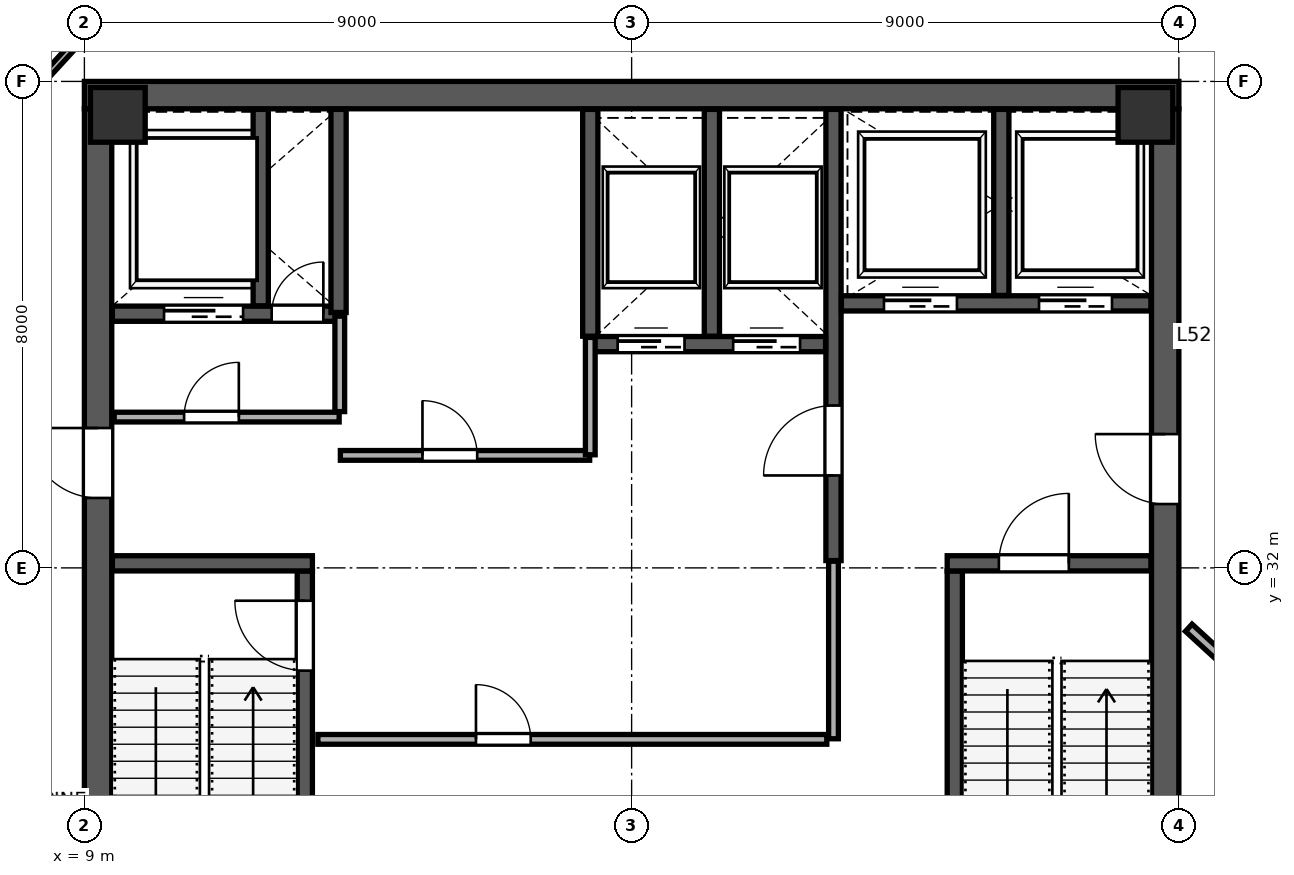
"""IFC4 building model, lengths in metres.
Left out: names, types, materials, properties, quantities, classifications, styles, units other than length and angle.
Written with IfcOpenShell. Run it as: python <this file> out.ifc"""

import sys

from ifc_helpers import new_model, si_unit, direction, frame, frame_2d, origin, origin_2d, place, context, subcontext, project, spatial, rectangle, extrude, source, transform, mapped, element, fill, save


model = new_model("IFC4")
c1 = context("Model", 3, precision=1e-05, world=origin(), true_north=direction((0.0, 1.0)))
c2 = subcontext(c1, "Body", "Model", "MODEL_VIEW")
j1 = project(units=[si_unit("LENGTHUNIT", "METRE"), si_unit("PLANEANGLEUNIT", "RADIAN")], contexts=[c1])
p1 = place(None, origin())
s1 = spatial("IfcSite", under=j1, at=p1, CompositionType="ELEMENT")
p2 = place(p1, origin())
s2 = spatial("IfcBuilding", under=s1, at=p2, CompositionType="ELEMENT")
p3 = place(p2, frame((0.0, 0.0, 233.2)))
s3 = spatial("IfcBuildingStorey", under=s2, at=p3, CompositionType="ELEMENT", Elevation=233.2)
m1 = source(origin(), c2, "Body", "SweptSolid", [
    extrude(rectangle(XDim=0.9, YDim=0.9, at=origin_2d()), origin(), (0.0, 0.0, 1.0), 4.198),
])
for number, where, z_axis, x_axis in (
    (1, (9.55, 39.45, 0.001), (0.0, 0.0, 1.0), (1.0, 0.0, 0.0)),
    (2, (26.45, 39.45, 0.001), (0.0, 0.0, 1.0), (1.0, 0.0, 0.0)),
):
    element("IfcColumn", number, at=place(p3, frame(where, z_axis=z_axis, x_axis=x_axis)), inside=s3, PredefinedType="COLUMN", context=c2, shape_type="MappedRepresentation", body=[
        mapped(m1, transform((0.0, 0.0, 0.0), scale=1.0)),
    ])
p4 = place(p3, frame((9.225, 24.45, 0.0), z_axis=(0.0, 0.0, 1.0), x_axis=(0.0, 1.0, 0.0)))
e3 = element("IfcWall", 3, at=p4, inside=s3, PredefinedType="SHEAR", context=c2, shape_type="SweptSolid", body=[
    extrude(rectangle(XDim=15.1, YDim=0.45, at=frame_2d((7.55, 0.0))), origin(), (0.0, 0.0, 1.0), 3.96),
])
p5 = place(p4, frame((8.7, 0.0, 0.0)))
e4 = element("IfcOpeningElement", 4, at=p5, cuts=e3, PredefinedType="OPENING", context=c2, shape_type="SweptSolid", body=[
    extrude(rectangle(XDim=1.15, YDim=2.2, at=frame_2d((0.575, 1.1))), frame((0.0, 0.235, 0.0), z_axis=(0.0, -1.0, 0.0), x_axis=(1.0, 0.0, 0.0)), (0.0, 0.0, 1.0), 0.47),
])
p6 = place(p3, frame((26.775, 24.45, 0.0), z_axis=(0.0, 0.0, 1.0), x_axis=(0.0, 1.0, 0.0)))
e5 = element("IfcWall", 5, at=p6, inside=s3, PredefinedType="SHEAR", context=c2, shape_type="SweptSolid", body=[
    extrude(rectangle(XDim=15.1, YDim=0.45, at=frame_2d((7.55, 0.0))), origin(), (0.0, 0.0, 1.0), 3.96),
])
p7 = place(p6, frame((8.6, 0.0, 0.0)))
e6 = element("IfcOpeningElement", 6, at=p7, cuts=e5, PredefinedType="OPENING", context=c2, shape_type="SweptSolid", body=[
    extrude(rectangle(XDim=1.15, YDim=2.2, at=frame_2d((0.575, 1.1))), frame((0.0, 0.235, 0.0), z_axis=(0.0, -1.0, 0.0), x_axis=(1.0, 0.0, 0.0)), (0.0, 0.0, 1.0), 0.47),
])
p8 = place(p3, frame((9.0, 39.775, 0.0), z_axis=(0.0, 0.0, 1.0), x_axis=(1.0, 0.0, 0.0)))
e7 = element("IfcWall", 7, at=p8, inside=s3, PredefinedType="SHEAR", context=c2, shape_type="SweptSolid", body=[
    extrude(rectangle(XDim=18.0, YDim=0.45, at=frame_2d((9.0, 0.0))), origin(), (0.0, 0.0, 1.0), 3.96),
])
p9 = place(p3, frame((12.625, 24.46, 0.0), z_axis=(0.0, 0.0, 1.0), x_axis=(0.0, 1.0, 0.0)))
e8 = element("IfcWall", 8, at=p9, inside=s3, PredefinedType="SHEAR", context=c2, shape_type="SweptSolid", body=[
    extrude(rectangle(XDim=7.49, YDim=0.25, at=frame_2d((3.745, 0.0))), origin(), (0.0, 0.0, 1.0), 3.96),
])
p10 = place(p9, frame((5.85, 0.0, 0.0)))
e9 = element("IfcOpeningElement", 9, at=p10, cuts=e8, PredefinedType="OPENING", context=c2, shape_type="SweptSolid", body=[
    extrude(rectangle(XDim=1.15, YDim=2.2, at=frame_2d((0.575, 1.1))), frame((0.0, 0.135, 0.0), z_axis=(0.0, -1.0, 0.0), x_axis=(1.0, 0.0, 0.0)), (0.0, 0.0, 1.0), 0.27),
])
p11 = place(p3, frame((9.46, 32.075, 0.0), z_axis=(0.0, 0.0, 1.0), x_axis=(1.0, 0.0, 0.0)))
e10 = element("IfcWall", 10, at=p11, inside=s3, PredefinedType="SHEAR", context=c2, shape_type="SweptSolid", body=[
    extrude(rectangle(XDim=3.29, YDim=0.25, at=frame_2d((1.645, 0.0))), origin(), (0.0, 0.0, 1.0), 3.96),
])
p12 = place(p3, frame((23.315, 24.46, 0.0), z_axis=(0.0, 0.0, 1.0), x_axis=(0.0, 1.0, 0.0)))
e11 = element("IfcWall", 11, at=p12, inside=s3, PredefinedType="SHEAR", context=c2, shape_type="SweptSolid", body=[
    extrude(rectangle(XDim=7.49, YDim=0.25, at=frame_2d((3.745, 0.0))), origin(), (0.0, 0.0, 1.0), 3.96),
])
p13 = place(p3, frame((23.19, 32.075, 0.0), z_axis=(0.0, 0.0, 1.0), x_axis=(1.0, 0.0, 0.0)))
e12 = element("IfcWall", 12, at=p13, inside=s3, PredefinedType="SHEAR", context=c2, shape_type="SweptSolid", body=[
    extrude(rectangle(XDim=3.35, YDim=0.25, at=frame_2d((1.675, 0.0))), origin(), (0.0, 0.0, 1.0), 3.96),
])
p14 = place(p13, frame((0.85, 0.0, 0.0)))
e13 = element("IfcOpeningElement", 13, at=p14, cuts=e12, PredefinedType="OPENING", context=c2, shape_type="SweptSolid", body=[
    extrude(rectangle(XDim=1.15, YDim=2.2, at=frame_2d((0.575, 1.1))), frame((0.0, 0.135, 0.0), z_axis=(0.0, -1.0, 0.0), x_axis=(1.0, 0.0, 0.0)), (0.0, 0.0, 1.0), 0.27),
])
p15 = place(p3, frame((21.32, 32.12, 0.0), z_axis=(0.0, 0.0, 1.0), x_axis=(0.0, 1.0, 0.0)))
e14 = element("IfcWall", 14, at=p15, inside=s3, PredefinedType="SHEAR", context=c2, shape_type="SweptSolid", body=[
    extrude(rectangle(XDim=7.42, YDim=0.25, at=frame_2d((3.71, 0.0))), origin(), (0.0, 0.0, 1.0), 3.96),
])
p16 = place(p15, frame((1.4, 0.0, 0.0)))
e15 = element("IfcOpeningElement", 15, at=p16, cuts=e14, PredefinedType="OPENING", context=c2, shape_type="SweptSolid", body=[
    extrude(rectangle(XDim=1.15, YDim=2.2, at=frame_2d((0.575, 1.1))), frame((0.0, 0.135, 0.0), z_axis=(0.0, -1.0, 0.0), x_axis=(1.0, 0.0, 0.0)), (0.0, 0.0, 1.0), 0.27),
])
p17 = place(p3, frame((9.46, 36.18, 0.0), z_axis=(0.0, 0.0, 1.0), x_axis=(1.0, 0.0, 0.0)))
e16 = element("IfcWall", 16, at=p17, inside=s3, PredefinedType="SHEAR", context=c2, shape_type="SweptSolid", body=[
    extrude(rectangle(XDim=3.79, YDim=0.25, at=frame_2d((1.895, 0.0))), origin(), (0.0, 0.0, 1.0), 3.96),
])
p18 = place(p17, frame((2.62, 0.0, 0.0)))
e17 = element("IfcOpeningElement", 17, at=p18, cuts=e16, PredefinedType="OPENING", context=c2, shape_type="SweptSolid", body=[
    extrude(rectangle(XDim=0.85, YDim=2.1, at=frame_2d((0.425, 1.05))), frame((0.0, 0.135, 0.0), z_axis=(0.0, -1.0, 0.0), x_axis=(1.0, 0.0, 0.0)), (0.0, 0.0, 1.0), 0.27),
])
p19 = place(p17, frame((0.85, 0.0, 0.0)))
e18 = element("IfcOpeningElement", 18, at=p19, cuts=e16, PredefinedType="OPENING", context=c2, shape_type="SweptSolid", body=[
    extrude(rectangle(XDim=1.3, YDim=2.25, at=frame_2d((0.65, 1.125))), frame((0.0, 0.135, 0.0), z_axis=(0.0, -1.0, 0.0), x_axis=(1.0, 0.0, 0.0)), (0.0, 0.0, 1.0), 0.27),
])
p20 = place(p3, frame((11.9, 36.31, 0.0), z_axis=(0.0, 0.0, 1.0), x_axis=(0.0, 1.0, 0.0)))
e19 = element("IfcWall", 19, at=p20, inside=s3, PredefinedType="SHEAR", context=c2, shape_type="SweptSolid", body=[
    extrude(rectangle(XDim=3.23, YDim=0.25, at=frame_2d((1.615, 0.0))), origin(), (0.0, 0.0, 1.0), 3.96),
])
p21 = place(p3, frame((21.45, 36.35, 0.0), z_axis=(0.0, 0.0, 1.0), x_axis=(1.0, 0.0, 0.0)))
e20 = element("IfcWall", 20, at=p21, inside=s3, PredefinedType="SHEAR", context=c2, shape_type="SweptSolid", body=[
    extrude(rectangle(XDim=5.09, YDim=0.25, at=frame_2d((2.545, 0.0))), origin(), (0.0, 0.0, 1.0), 3.96),
])
p22 = place(p21, frame((0.7, 0.0, 0.0)))
e21 = element("IfcOpeningElement", 21, at=p22, cuts=e20, PredefinedType="OPENING", context=c2, shape_type="SweptSolid", body=[
    extrude(rectangle(XDim=1.2, YDim=2.2, at=frame_2d((0.6, 1.1))), frame((0.0, 0.135, 0.0), z_axis=(0.0, -1.0, 0.0), x_axis=(1.0, 0.0, 0.0)), (0.0, 0.0, 1.0), 0.27),
])
p23 = place(p21, frame((3.25, 0.0, 0.0)))
e22 = element("IfcOpeningElement", 22, at=p23, cuts=e20, PredefinedType="OPENING", context=c2, shape_type="SweptSolid", body=[
    extrude(rectangle(XDim=1.2, YDim=2.2, at=frame_2d((0.6, 1.1))), frame((0.0, 0.135, 0.0), z_axis=(0.0, -1.0, 0.0), x_axis=(1.0, 0.0, 0.0)), (0.0, 0.0, 1.0), 0.27),
])
p24 = place(p3, frame((24.08, 36.48, 0.0), z_axis=(0.0, 0.0, 1.0), x_axis=(0.0, 1.0, 0.0)))
e23 = element("IfcWall", 23, at=p24, inside=s3, PredefinedType="SHEAR", context=c2, shape_type="SweptSolid", body=[
    extrude(rectangle(XDim=3.06, YDim=0.25, at=frame_2d((1.53, 0.0))), origin(), (0.0, 0.0, 1.0), 3.96),
])
p25 = place(p3, frame((13.18, 36.2, 0.0), z_axis=(0.0, 0.0, 1.0), x_axis=(0.0, 1.0, 0.0)))
e24 = element("IfcWall", 24, at=p25, inside=s3, PredefinedType="SHEAR", context=c2, shape_type="SweptSolid", body=[
    extrude(rectangle(XDim=3.34, YDim=0.25, at=frame_2d((1.67, 0.0))), origin(), (0.0, 0.0, 1.0), 3.96),
])
p26 = place(p3, frame((17.32, 35.68, 0.0), z_axis=(0.0, 0.0, 1.0), x_axis=(1.0, 0.0, 0.0)))
e25 = element("IfcWall", 25, at=p26, inside=s3, PredefinedType="SHEAR", context=c2, shape_type="SweptSolid", body=[
    extrude(rectangle(XDim=3.87, YDim=0.25, at=frame_2d((1.935, 0.0))), origin(), (0.0, 0.0, 1.0), 3.96),
])
p27 = place(p26, frame((0.45, 0.0, 0.0)))
e26 = element("IfcOpeningElement", 26, at=p27, cuts=e25, PredefinedType="OPENING", context=c2, shape_type="SweptSolid", body=[
    extrude(rectangle(XDim=1.1, YDim=2.2, at=frame_2d((0.55, 1.1))), frame((0.0, 0.135, 0.0), z_axis=(0.0, -1.0, 0.0), x_axis=(1.0, 0.0, 0.0)), (0.0, 0.0, 1.0), 0.27),
])
p28 = place(p26, frame((2.35, 0.0, 0.0)))
e27 = element("IfcOpeningElement", 27, at=p28, cuts=e25, PredefinedType="OPENING", context=c2, shape_type="SweptSolid", body=[
    extrude(rectangle(XDim=1.1, YDim=2.2, at=frame_2d((0.55, 1.1))), frame((0.0, 0.135, 0.0), z_axis=(0.0, -1.0, 0.0), x_axis=(1.0, 0.0, 0.0)), (0.0, 0.0, 1.0), 0.27),
])
for number, where, z_axis, x_axis in (
    (28, (17.32, 35.81, 0.0), (0.0, 0.0, 1.0), (0.0, 1.0, 0.0)),
    (29, (19.32, 35.81, 0.0), (0.0, 0.0, 1.0), (0.0, 1.0, 0.0)),
):
    element("IfcWall", number, at=place(p3, frame(where, z_axis=z_axis, x_axis=x_axis)), inside=s3, PredefinedType="SHEAR", context=c2, shape_type="SweptSolid", body=[
        extrude(rectangle(XDim=3.73, YDim=0.25, at=frame_2d((1.865, 0.0))), origin(), (0.0, 0.0, 1.0), 3.96),
    ])
p29 = place(p3, frame((9.49, 34.48, 0.0), z_axis=(0.0, 0.0, 1.0), x_axis=(1.0, 0.0, 0.0)))
e30 = element("IfcWall", 30, at=p29, inside=s3, PredefinedType="PARTITIONING", context=c2, shape_type="SweptSolid", body=[
    extrude(rectangle(XDim=3.7, YDim=0.16, at=frame_2d((1.85, 0.0))), origin(), (0.0, 0.0, 1.0), 3.96),
])
p30 = place(p29, frame((1.15, 0.0, 0.0)))
e31 = element("IfcOpeningElement", 31, at=p30, cuts=e30, PredefinedType="OPENING", context=c2, shape_type="SweptSolid", body=[
    extrude(rectangle(XDim=0.9, YDim=2.15, at=frame_2d((0.45, 1.075))), frame((0.0, 0.09, 0.0), z_axis=(0.0, -1.0, 0.0), x_axis=(1.0, 0.0, 0.0)), (0.0, 0.0, 1.0), 0.18),
])
p31 = place(p3, frame((13.2, 34.57, 0.0), z_axis=(0.0, 0.0, 1.0), x_axis=(0.0, 1.0, 0.0)))
e32 = element("IfcWall", 32, at=p31, inside=s3, PredefinedType="PARTITIONING", context=c2, shape_type="SweptSolid", body=[
    extrude(rectangle(XDim=1.57, YDim=0.16, at=frame_2d((0.785, 0.0))), origin(), (0.0, 0.0, 1.0), 3.96),
])
p32 = place(p3, frame((13.21, 33.85, 0.0), z_axis=(0.0, 0.0, 1.0), x_axis=(1.0, 0.0, 0.0)))
e33 = element("IfcWall", 33, at=p32, inside=s3, PredefinedType="PARTITIONING", context=c2, shape_type="SweptSolid", body=[
    extrude(rectangle(XDim=4.1, YDim=0.16, at=frame_2d((2.05, 0.0))), origin(), (0.0, 0.0, 1.0), 3.96),
])
p33 = place(p32, frame((1.35, 0.0, 0.0)))
e34 = element("IfcOpeningElement", 34, at=p33, cuts=e33, PredefinedType="OPENING", context=c2, shape_type="SweptSolid", body=[
    extrude(rectangle(XDim=0.9, YDim=2.15, at=frame_2d((0.45, 1.075))), frame((0.0, 0.09, 0.0), z_axis=(0.0, -1.0, 0.0), x_axis=(1.0, 0.0, 0.0)), (0.0, 0.0, 1.0), 0.18),
])
p34 = place(p3, frame((17.32, 33.86, 0.0), z_axis=(0.0, 0.0, 1.0), x_axis=(0.0, 1.0, 0.0)))
e35 = element("IfcWall", 35, at=p34, inside=s3, PredefinedType="PARTITIONING", context=c2, shape_type="SweptSolid", body=[
    extrude(rectangle(XDim=1.93, YDim=0.16, at=frame_2d((0.965, 0.0))), origin(), (0.0, 0.0, 1.0), 3.96),
])
p35 = place(p3, frame((12.84, 29.18, 0.0), z_axis=(0.0, 0.0, 1.0), x_axis=(1.0, 0.0, 0.0)))
e36 = element("IfcWall", 36, at=p35, inside=s3, PredefinedType="PARTITIONING", context=c2, shape_type="SweptSolid", body=[
    extrude(rectangle(XDim=8.37, YDim=0.16, at=frame_2d((4.185, 0.0))), origin(), (0.0, 0.0, 1.0), 3.96),
])
p36 = place(p35, frame((2.6, 0.0, 0.0)))
e37 = element("IfcOpeningElement", 37, at=p36, cuts=e36, PredefinedType="OPENING", context=c2, shape_type="SweptSolid", body=[
    extrude(rectangle(XDim=0.9, YDim=2.15, at=frame_2d((0.45, 1.075))), frame((0.0, 0.09, 0.0), z_axis=(0.0, -1.0, 0.0), x_axis=(1.0, 0.0, 0.0)), (0.0, 0.0, 1.0), 0.18),
])
p37 = place(p3, frame((21.32, 29.19, 0.0), z_axis=(0.0, 0.0, 1.0), x_axis=(0.0, 1.0, 0.0)))
e38 = element("IfcWall", 38, at=p37, inside=s3, PredefinedType="PARTITIONING", context=c2, shape_type="SweptSolid", body=[
    extrude(rectangle(XDim=2.92, YDim=0.16, at=frame_2d((1.46, 0.0))), origin(), (0.0, 0.0, 1.0), 3.96),
])
p38 = place(p3, frame((27.163, 31.016, 0.0), z_axis=(0.0, 0.0, 1.0), x_axis=(0.737296869908, -0.675568890361, 0.0)))
e39 = element("IfcWall", 39, at=p38, inside=s3, PredefinedType="PARTITIONING", context=c2, shape_type="SweptSolid", body=[
    extrude(rectangle(XDim=1.42, YDim=0.16, at=frame_2d((0.71, 0.0))), origin(), (0.0, 0.0, 1.0), 3.96),
])
p39 = place(p3, frame((17.504, 50.744, 0.0), z_axis=(0.0, 0.0, 1.0), x_axis=(0.737277850523, -0.675589646996, 0.0)))
e40 = element("IfcWall", 40, at=p39, inside=s3, PredefinedType="PARTITIONING", context=c2, shape_type="SweptSolid", body=[
    extrude(rectangle(XDim=21.87, YDim=0.1, at=frame_2d((10.935, 0.0))), origin(), (0.0, 0.0, 1.0), 3.96),
])
p40 = place(p39, frame((5.4, 0.0, 0.0)))
e41 = element("IfcOpeningElement", 41, at=p40, cuts=e40, PredefinedType="OPENING", context=c2, shape_type="SweptSolid", body=[
    extrude(rectangle(XDim=0.95, YDim=2.15, at=frame_2d((0.475, 1.075))), frame((0.0, 0.06, 0.0), z_axis=(0.0, -1.0, 0.0), x_axis=(1.0, 0.0, 0.0)), (0.0, 0.0, 1.0), 0.12),
])
p41 = place(p3, frame((1.73, 32.85, 0.0), z_axis=(0.0, 0.0, 1.0), x_axis=(0.675589845589, 0.737277668546, 0.0)))
e42 = element("IfcWall", 42, at=p41, inside=s3, PredefinedType="PARTITIONING", context=c2, shape_type="SweptSolid", body=[
    extrude(rectangle(XDim=26.742, YDim=0.115, at=frame_2d((13.371, 0.0))), origin(), (0.0, 0.0, 1.0), 3.96),
])
m2 = source(origin(), c2, "Body", "SweptSolid", [
    extrude(rectangle(XDim=1.15, YDim=2.2, at=frame_2d((0.575, 1.1))), frame((0.0, 0.025, 0.0), z_axis=(0.0, -1.0, 0.0), x_axis=(1.0, 0.0, 0.0)), (0.0, 0.0, 1.0), 0.05),
])
p42 = place(p10, origin())
e43 = element("IfcDoor", 43, at=p42, inside=s3, OperationType="SINGLE_SWING_RIGHT", PredefinedType="DOOR", context=c2, shape_type="MappedRepresentation", body=[
    mapped(m2, transform((0.0, 0.0, 0.0), scale=1.0)),
])
fill(e9, e43)
m3 = source(origin(), c2, "Body", "SweptSolid", [
    extrude(rectangle(XDim=1.15, YDim=2.2, at=frame_2d((0.575, 1.1))), frame((0.0, 0.025, 0.0), z_axis=(0.0, -1.0, 0.0), x_axis=(1.0, 0.0, 0.0)), (0.0, 0.0, 1.0), 0.05),
])
p43 = place(p16, origin())
e44 = element("IfcDoor", 44, at=p43, inside=s3, OperationType="SINGLE_SWING_LEFT", PredefinedType="DOOR", context=c2, shape_type="MappedRepresentation", body=[
    mapped(m3, transform((0.0, 0.0, 0.0), scale=1.0)),
])
fill(e15, e44)
p44 = place(p14, origin())
e45 = element("IfcDoor", 45, at=p44, inside=s3, OperationType="SINGLE_SWING_RIGHT", PredefinedType="DOOR", context=c2, shape_type="MappedRepresentation", body=[
    mapped(m2, transform((0.0, 0.0, 0.0), scale=1.0)),
])
fill(e13, e45)
p45 = place(p7, origin())
e46 = element("IfcDoor", 46, at=p45, inside=s3, OperationType="SINGLE_SWING_RIGHT", PredefinedType="DOOR", context=c2, shape_type="MappedRepresentation", body=[
    mapped(m3, transform((0.0, 0.0, 0.0), scale=1.0)),
])
fill(e6, e46)
p46 = place(p5, origin())
e47 = element("IfcDoor", 47, at=p46, inside=s3, OperationType="SINGLE_SWING_RIGHT", PredefinedType="DOOR", context=c2, shape_type="MappedRepresentation", body=[
    mapped(m3, transform((0.0, 0.0, 0.0), scale=1.0)),
])
fill(e4, e47)
m4 = source(origin(), c2, "Body", "SweptSolid", [
    extrude(rectangle(XDim=0.85, YDim=2.1, at=frame_2d((0.425, 1.05))), frame((0.0, 0.025, 0.0), z_axis=(0.0, -1.0, 0.0), x_axis=(1.0, 0.0, 0.0)), (0.0, 0.0, 1.0), 0.05),
])
p47 = place(p18, origin())
e48 = element("IfcDoor", 48, at=p47, inside=s3, OperationType="SINGLE_SWING_RIGHT", PredefinedType="DOOR", context=c2, shape_type="MappedRepresentation", body=[
    mapped(m4, transform((0.0, 0.0, 0.0), scale=1.0)),
])
fill(e17, e48)
m5 = source(origin(), c2, "Body", "SweptSolid", [
    extrude(rectangle(XDim=1.1, YDim=2.2, at=frame_2d((0.55, 1.1))), frame((0.0, 0.025, 0.0), z_axis=(0.0, -1.0, 0.0), x_axis=(1.0, 0.0, 0.0)), (0.0, 0.0, 1.0), 0.05),
])
p48 = place(p27, origin())
e49 = element("IfcDoor", 49, at=p48, inside=s3, OperationType="SLIDING_TO_LEFT", PredefinedType="DOOR", context=c2, shape_type="MappedRepresentation", body=[
    mapped(m5, transform((0.0, 0.0, 0.0), scale=1.0)),
])
fill(e26, e49)
p49 = place(p28, origin())
e50 = element("IfcDoor", 50, at=p49, inside=s3, OperationType="SLIDING_TO_RIGHT", PredefinedType="DOOR", context=c2, shape_type="MappedRepresentation", body=[
    mapped(m5, transform((0.0, 0.0, 0.0), scale=1.0)),
])
fill(e27, e50)
m6 = source(origin(), c2, "Body", "SweptSolid", [
    extrude(rectangle(XDim=1.2, YDim=2.2, at=frame_2d((0.6, 1.1))), frame((0.0, 0.025, 0.0), z_axis=(0.0, -1.0, 0.0), x_axis=(1.0, 0.0, 0.0)), (0.0, 0.0, 1.0), 0.05),
])
p50 = place(p22, origin())
e51 = element("IfcDoor", 51, at=p50, inside=s3, OperationType="SLIDING_TO_LEFT", PredefinedType="DOOR", context=c2, shape_type="MappedRepresentation", body=[
    mapped(m6, transform((0.0, 0.0, 0.0), scale=1.0)),
])
fill(e21, e51)
p51 = place(p23, origin())
e52 = element("IfcDoor", 52, at=p51, inside=s3, OperationType="SLIDING_TO_RIGHT", PredefinedType="DOOR", context=c2, shape_type="MappedRepresentation", body=[
    mapped(m6, transform((0.0, 0.0, 0.0), scale=1.0)),
])
fill(e22, e52)
m7 = source(origin(), c2, "Body", "SweptSolid", [
    extrude(rectangle(XDim=1.3, YDim=2.25, at=frame_2d((0.65, 1.125))), frame((0.0, 0.025, 0.0), z_axis=(0.0, -1.0, 0.0), x_axis=(1.0, 0.0, 0.0)), (0.0, 0.0, 1.0), 0.05),
])
p52 = place(p19, origin())
e53 = element("IfcDoor", 53, at=p52, inside=s3, OperationType="SLIDING_TO_LEFT", PredefinedType="DOOR", context=c2, shape_type="MappedRepresentation", body=[
    mapped(m7, transform((0.0, 0.0, 0.0), scale=1.0)),
])
fill(e18, e53)
m8 = source(origin(), c2, "Body", "SweptSolid", [
    extrude(rectangle(XDim=0.9, YDim=2.15, at=frame_2d((0.45, 1.075))), frame((0.0, 0.025, 0.0), z_axis=(0.0, -1.0, 0.0), x_axis=(1.0, 0.0, 0.0)), (0.0, 0.0, 1.0), 0.05),
])
p53 = place(p30, origin())
e54 = element("IfcDoor", 54, at=p53, inside=s3, OperationType="SINGLE_SWING_RIGHT", PredefinedType="DOOR", context=c2, shape_type="MappedRepresentation", body=[
    mapped(m8, transform((0.0, 0.0, 0.0), scale=1.0)),
])
fill(e31, e54)
p54 = place(p33, origin())
e55 = element("IfcDoor", 55, at=p54, inside=s3, OperationType="SINGLE_SWING_LEFT", PredefinedType="DOOR", context=c2, shape_type="MappedRepresentation", body=[
    mapped(m8, transform((0.0, 0.0, 0.0), scale=1.0)),
])
fill(e34, e55)
p55 = place(p36, origin())
e56 = element("IfcDoor", 56, at=p55, inside=s3, OperationType="SINGLE_SWING_LEFT", PredefinedType="DOOR", context=c2, shape_type="MappedRepresentation", body=[
    mapped(m8, transform((0.0, 0.0, 0.0), scale=1.0)),
])
fill(e37, e56)
save(model, sys.argv[1])
